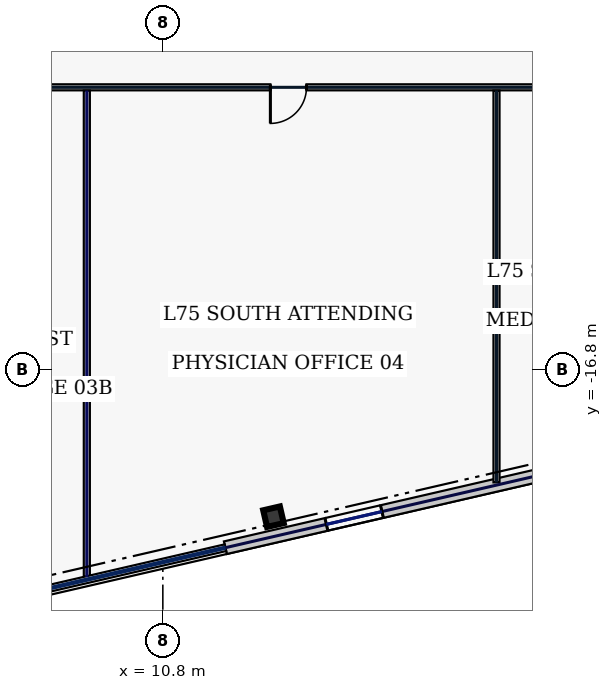
"""IFC4 building model, lengths in metres.
Left out: names, types, materials, properties, quantities, classifications, styles, units other than length and angle.
Written with IfcOpenShell. Run it as: python <this file> out.ifc"""

import sys

from ifc_helpers import new_model, si_unit, direction, frame, frame_2d, origin, origin_2d, place, context, subcontext, project, spatial, rectangle, hollow_rectangle, extrude, element, fill, save


model = new_model("IFC4")
c1 = context("Model", 3, precision=1e-05, world=origin(), true_north=direction((0.0, 1.0)))
c2 = subcontext(c1, "Body", "Model", "MODEL_VIEW")
j1 = project(units=[si_unit("LENGTHUNIT", "METRE"), si_unit("PLANEANGLEUNIT", "RADIAN")], contexts=[c1])
p1 = place(None, origin())
s1 = spatial("IfcSite", under=j1, at=p1, CompositionType="ELEMENT")
p2 = place(p1, origin())
s2 = spatial("IfcBuilding", under=s1, at=p2, CompositionType="ELEMENT")
p3 = place(p2, frame((0.0, 0.0, 321.0)))
s3 = spatial("IfcBuildingStorey", under=s2, at=p3, CompositionType="ELEMENT", Elevation=321.0)
p4 = place(p3, frame((13.711, -20.68, 0.0), z_axis=(0.0, 0.0, 1.0), x_axis=(0.974370064785, 0.224951054344, 0.0)))
e1 = element("IfcColumn", 1, at=p4, inside=s3, PredefinedType="COLUMN", context=c2, shape_type="SweptSolid", body=[
    extrude(hollow_rectangle(XDim=0.45, YDim=0.45, WallThickness=0.022, at=origin_2d()), origin(), (0.0, 0.0, 1.0), 3.74),
])
p5 = place(p3, frame((12.445, -21.495, 0.0), z_axis=(0.0, 0.0, 1.0), x_axis=(0.974369392164, 0.224953967767, 0.0)))
e2 = element("IfcWall", 2, at=p5, inside=s3, PredefinedType="STANDARD", context=c2, shape_type="SweptSolid", body=[
    extrude(rectangle(XDim=17.366, YDim=0.34, at=frame_2d((8.683, 0.0))), origin(), (0.0, 0.0, 1.0), 3.74),
])
p6 = place(p5, frame((2.729, 0.0, 0.9)))
e3 = element("IfcOpeningElement", 3, at=p6, cuts=e2, PredefinedType="OPENING", context=c2, shape_type="SweptSolid", body=[
    extrude(rectangle(XDim=1.5, YDim=2.0, at=frame_2d((0.75, 1.0))), frame((0.0, 0.18, 0.0), z_axis=(0.0, -1.0, 0.0), x_axis=(1.0, 0.0, 0.0)), (0.0, 0.0, 1.0), 0.36),
])
p7 = place(p5, frame((10.363, 0.0, 0.9)))
e4 = element("IfcOpeningElement", 4, at=p7, cuts=e2, PredefinedType="OPENING", context=c2, shape_type="SweptSolid", body=[
    extrude(rectangle(XDim=0.85, YDim=1.85, at=frame_2d((0.425, 0.925))), frame((0.0, 0.18, 0.0), z_axis=(0.0, -1.0, 0.0), x_axis=(1.0, 0.0, 0.0)), (0.0, 0.0, 1.0), 0.36),
])
p8 = place(p5, frame((13.875, 0.0, 0.9)))
e5 = element("IfcOpeningElement", 5, at=p8, cuts=e2, PredefinedType="OPENING", context=c2, shape_type="SweptSolid", body=[
    extrude(rectangle(XDim=1.5, YDim=2.0, at=frame_2d((0.75, 1.0))), frame((0.0, 0.18, 0.0), z_axis=(0.0, -1.0, 0.0), x_axis=(1.0, 0.0, 0.0)), (0.0, 0.0, 1.0), 0.36),
])
p9 = place(p3, frame((24.145, -9.38, 0.0), z_axis=(0.0, 0.0, 1.0), x_axis=(-1.0, 0.0, 0.0)))
e6 = element("IfcWall", 6, at=p9, inside=s3, PredefinedType="PARTITIONING", context=c2, shape_type="SweptSolid", body=[
    extrude(rectangle(XDim=36.68, YDim=0.16, at=frame_2d((18.34, 0.0))), origin(), (0.0, 0.0, 1.0), 3.74),
])
p10 = place(p9, frame((33.19, 0.0, 0.0)))
e7 = element("IfcOpeningElement", 7, at=p10, cuts=e6, PredefinedType="OPENING", context=c2, shape_type="SweptSolid", body=[
    extrude(rectangle(XDim=0.95, YDim=2.2, at=frame_2d((0.475, 1.1))), frame((0.0, 0.09, 0.0), z_axis=(0.0, -1.0, 0.0), x_axis=(1.0, 0.0, 0.0)), (0.0, 0.0, 1.0), 0.18),
])
p11 = place(p9, frame((26.43, 0.0, 0.0)))
e8 = element("IfcOpeningElement", 8, at=p11, cuts=e6, PredefinedType="OPENING", context=c2, shape_type="SweptSolid", body=[
    extrude(rectangle(XDim=0.95, YDim=2.2, at=frame_2d((0.475, 1.1))), frame((0.0, 0.09, 0.0), z_axis=(0.0, -1.0, 0.0), x_axis=(1.0, 0.0, 0.0)), (0.0, 0.0, 1.0), 0.18),
])
p12 = place(p9, frame((18.63, 0.0, 0.0)))
e9 = element("IfcOpeningElement", 9, at=p12, cuts=e6, PredefinedType="OPENING", context=c2, shape_type="SweptSolid", body=[
    extrude(rectangle(XDim=1.15, YDim=2.2, at=frame_2d((0.575, 1.1))), frame((0.0, 0.09, 0.0), z_axis=(0.0, -1.0, 0.0), x_axis=(1.0, 0.0, 0.0)), (0.0, 0.0, 1.0), 0.18),
])
p13 = place(p9, frame((9.565, 0.0, 0.0)))
e10 = element("IfcOpeningElement", 10, at=p13, cuts=e6, PredefinedType="OPENING", context=c2, shape_type="SweptSolid", body=[
    extrude(rectangle(XDim=0.95, YDim=2.2, at=frame_2d((0.475, 1.1))), frame((0.0, 0.09, 0.0), z_axis=(0.0, -1.0, 0.0), x_axis=(1.0, 0.0, 0.0)), (0.0, 0.0, 1.0), 0.18),
])
p14 = place(p9, frame((1.869, 0.0, 0.0)))
e11 = element("IfcOpeningElement", 11, at=p14, cuts=e6, PredefinedType="OPENING", context=c2, shape_type="SweptSolid", body=[
    extrude(rectangle(XDim=1.3, YDim=2.2, at=frame_2d((0.65, 1.1))), frame((0.0, 0.09, 0.0), z_axis=(0.0, -1.0, 0.0), x_axis=(1.0, 0.0, 0.0)), (0.0, 0.0, 1.0), 0.18),
])
p15 = place(p3, frame((8.8, -22.265, 0.0), z_axis=(0.0, 0.0, 1.0), x_axis=(0.0, 1.0, 0.0)))
e12 = element("IfcWall", 12, at=p15, inside=s3, PredefinedType="PARTITIONING", context=c2, shape_type="SweptSolid", body=[
    extrude(rectangle(XDim=12.8, YDim=0.16, at=frame_2d((6.4, 0.0))), origin(), (0.0, 0.0, 1.0), 3.165),
])
p16 = place(p3, frame((19.58, -19.776, 0.0), z_axis=(0.0, 0.0, 1.0), x_axis=(0.0, 1.0, 0.0)))
e13 = element("IfcWall", 13, at=p16, inside=s3, PredefinedType="PARTITIONING", context=c2, shape_type="SweptSolid", body=[
    extrude(rectangle(XDim=10.311, YDim=0.16, at=frame_2d((5.156, 0.0))), origin(), (0.0, 0.0, 1.0), 3.74),
])
p17 = place(p6, origin())
e14 = element("IfcWindow", 14, at=p17, inside=s3, PartitioningType="SINGLE_PANEL", PredefinedType="WINDOW", context=c2, shape_type="SweptSolid", body=[
    extrude(rectangle(XDim=1.5, YDim=2.0, at=frame_2d((0.75, 1.0))), frame((0.0, 0.03, 0.0), z_axis=(0.0, -1.0, 0.0), x_axis=(1.0, 0.0, 0.0)), (0.0, 0.0, 1.0), 0.06),
])
fill(e3, e14)
p18 = place(p13, origin())
e15 = element("IfcDoor", 15, at=p18, inside=s3, OperationType="SINGLE_SWING_RIGHT", PredefinedType="DOOR", context=c2, shape_type="SweptSolid", body=[
    extrude(rectangle(XDim=0.95, YDim=2.2, at=frame_2d((0.475, 1.1))), frame((0.0, 0.025, 0.0), z_axis=(0.0, -1.0, 0.0), x_axis=(1.0, 0.0, 0.0)), (0.0, 0.0, 1.0), 0.05),
])
fill(e10, e15)
save(model, sys.argv[1])
